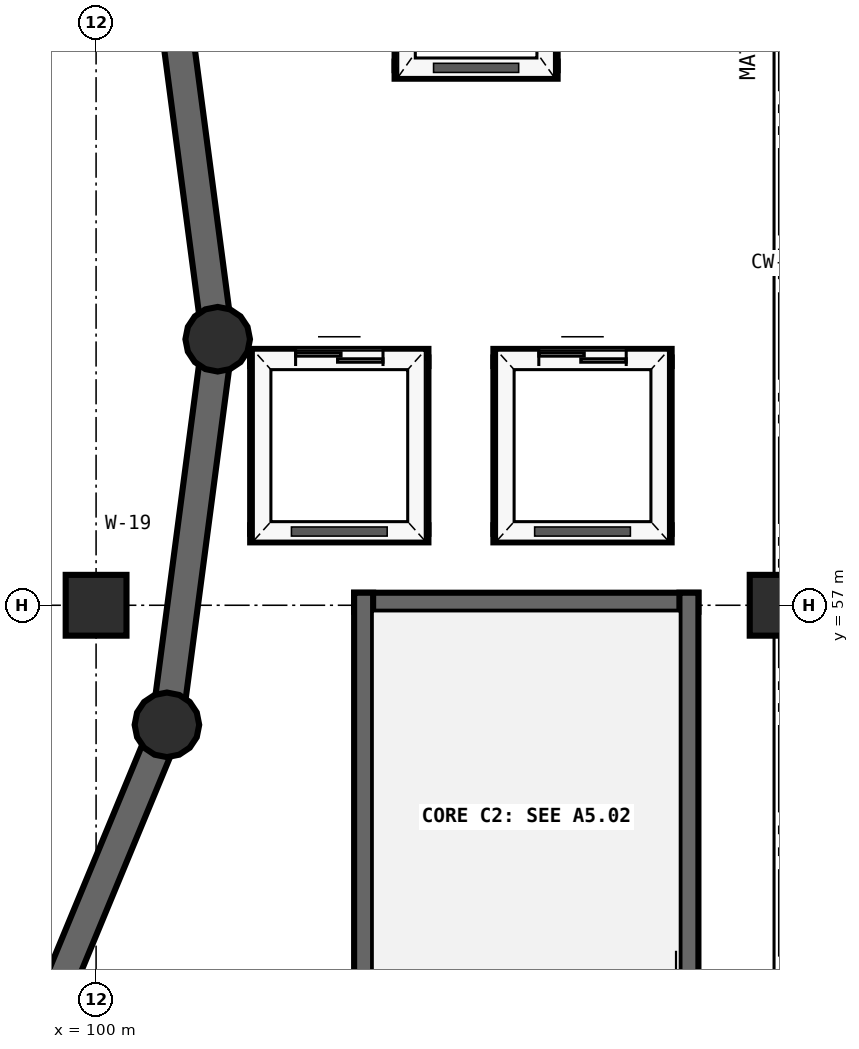
"""IFC4 building model, lengths in metres.
Left out: names, types, materials, properties, quantities, classifications, styles, units other than length and angle.
Written with IfcOpenShell. Run it as: python <this file> out.ifc"""

import sys

from ifc_helpers import new_model, si_unit, direction, frame, frame_2d, origin, origin_2d, place, context, subcontext, project, spatial, rectangle, circle, extrude, element, fill, save


model = new_model("IFC4")
c1 = context("Model", 3, precision=1e-05, world=origin(), true_north=direction((0.0, 1.0)))
c2 = subcontext(c1, "Body", "Model", "MODEL_VIEW")
j1 = project(units=[si_unit("LENGTHUNIT", "METRE"), si_unit("PLANEANGLEUNIT", "RADIAN")], contexts=[c1])
p1 = place(None, origin())
s1 = spatial("IfcSite", under=j1, at=p1, CompositionType="ELEMENT")
p2 = place(p1, origin())
s2 = spatial("IfcBuilding", under=s1, at=p2, CompositionType="ELEMENT")
p3 = place(p2, frame((0.0, 0.0, 5.4)))
s3 = spatial("IfcBuildingStorey", under=s2, at=p3, CompositionType="ELEMENT", Elevation=5.4)
for number, where, z_axis, x_axis in (
    (1, (100.0, 57.0, 0.0), (0.0, 0.0, 1.0), (1.0, 0.0, 0.0)),
    (2, (109.0, 57.0, 0.0), (0.0, 0.0, 1.0), (1.0, 0.0, 0.0)),
):
    element("IfcColumn", number, at=place(p3, frame(where, z_axis=z_axis, x_axis=x_axis)), inside=s3, PredefinedType="COLUMN", context=c2, shape_type="SweptSolid", body=[
        extrude(rectangle(XDim=0.8, YDim=0.8, at=origin_2d()), origin(), (0.0, 0.0, 1.0), 4.54),
    ])
for number, where, z_axis, x_axis in (
    (3, (101.6, 60.5, 0.0), (0.0, 0.0, 1.0), (1.0, 0.0, 0.0)),
    (4, (100.932, 55.427, 0.0), (0.0, 0.0, 1.0), (1.0, 0.0, 0.0)),
):
    element("IfcColumn", number, at=place(p3, frame(where, z_axis=z_axis, x_axis=x_axis)), inside=s3, PredefinedType="COLUMN", context=c2, shape_type="SweptSolid", body=[
        extrude(circle(Radius=0.425, at=origin_2d()), origin(), (0.0, 0.0, 1.0), 4.54),
    ])
p4 = place(p3, frame((101.6, 60.5, 0.0), z_axis=(0.0, 0.0, 1.0), x_axis=(-0.130591512704, 0.99143625958, 0.0)))
e5 = element("IfcWall", 5, at=p4, inside=s3, PredefinedType="SHEAR", context=c2, shape_type="SweptSolid", body=[
    extrude(rectangle(XDim=5.117, YDim=0.4, at=frame_2d((2.558, 0.0))), origin(), (0.0, 0.0, 1.0), 4.54),
])
p5 = place(p3, frame((98.974, 50.7, 0.0), z_axis=(0.0, 0.0, 1.0), x_axis=(0.382642581018, 0.923896452635, 0.0)))
e6 = element("IfcWall", 6, at=p5, inside=s3, PredefinedType="SHEAR", context=c2, shape_type="SweptSolid", body=[
    extrude(rectangle(XDim=5.116, YDim=0.4, at=frame_2d((2.558, 0.0))), origin(), (0.0, 0.0, 1.0), 4.54),
])
p6 = place(p3, frame((100.932, 55.427, 0.0), z_axis=(0.0, 0.0, 1.0), x_axis=(0.130591512704, 0.99143625958, 0.0)))
e7 = element("IfcWall", 7, at=p6, inside=s3, PredefinedType="SHEAR", context=c2, shape_type="SweptSolid", body=[
    extrude(rectangle(XDim=5.117, YDim=0.4, at=frame_2d((2.558, 0.0))), origin(), (0.0, 0.0, 1.0), 4.54),
])
p7 = place(p3, frame((103.395, 57.04, 0.0), z_axis=(0.0, 0.0, 1.0), x_axis=(1.0, 0.0, 0.0)))
e8 = element("IfcWall", 8, at=p7, inside=s3, PredefinedType="SHEAR", context=c2, shape_type="SweptSolid", body=[
    extrude(rectangle(XDim=4.53, YDim=0.25, at=frame_2d((2.265, 0.0))), origin(), (0.0, 0.0, 1.0), 4.54),
])
for number, where, z_axis, x_axis in (
    (9, (103.52, 46.075, 0.0), (0.0, 0.0, 1.0), (0.0, 1.0, 0.0)),
    (10, (107.8, 46.075, 0.0), (0.0, 0.0, 1.0), (0.0, 1.0, 0.0)),
):
    element("IfcWall", number, at=place(p3, frame(where, z_axis=z_axis, x_axis=x_axis)), inside=s3, PredefinedType="SHEAR", context=c2, shape_type="SweptSolid", body=[
        extrude(rectangle(XDim=11.09, YDim=0.25, at=frame_2d((5.545, 0.0))), origin(), (0.0, 0.0, 1.0), 4.54),
    ])
p8 = place(p3, frame((102.028, 60.26, 0.0), z_axis=(0.0, 0.0, 1.0), x_axis=(1.0, 0.0, 0.0)))
e11 = element("IfcWall", 11, at=p8, inside=s3, PredefinedType="SOLIDWALL", context=c2, shape_type="SweptSolid", body=[
    extrude(rectangle(XDim=2.345, YDim=0.225, at=frame_2d((1.172, 0.0))), origin(), (0.0, 0.0, 1.0), 4.49),
])
p9 = place(p8, frame((0.597, 0.0, 0.0)))
e12 = element("IfcOpeningElement", 12, at=p9, cuts=e11, PredefinedType="OPENING", context=c2, shape_type="SweptSolid", body=[
    extrude(rectangle(XDim=1.15, YDim=2.2, at=frame_2d((0.575, 1.1))), frame((0.0, 0.123, 0.0), z_axis=(0.0, -1.0, 0.0), x_axis=(1.0, 0.0, 0.0)), (0.0, 0.0, 1.0), 0.245),
])
p10 = place(p3, frame((102.028, 57.94, 0.0), z_axis=(0.0, 0.0, 1.0), x_axis=(1.0, 0.0, 0.0)))
e13 = element("IfcWall", 13, at=p10, inside=s3, PredefinedType="SOLIDWALL", context=c2, shape_type="SweptSolid", body=[
    extrude(rectangle(XDim=2.345, YDim=0.225, at=frame_2d((1.172, 0.0))), origin(), (0.0, 0.0, 1.0), 4.49),
])
for number, where, z_axis, x_axis in (
    (14, (102.14, 57.94, 0.0), (0.0, 0.0, 1.0), (0.0, 1.0, 0.0)),
    (15, (104.26, 57.94, 0.0), (0.0, 0.0, 1.0), (0.0, 1.0, 0.0)),
):
    element("IfcWall", number, at=place(p3, frame(where, z_axis=z_axis, x_axis=x_axis)), inside=s3, PredefinedType="SOLIDWALL", context=c2, shape_type="SweptSolid", body=[
        extrude(rectangle(XDim=2.32, YDim=0.225, at=frame_2d((1.16, 0.0))), origin(), (0.0, 0.0, 1.0), 4.49),
    ])
p11 = place(p3, frame((105.228, 60.26, 0.0), z_axis=(0.0, 0.0, 1.0), x_axis=(1.0, 0.0, 0.0)))
e16 = element("IfcWall", 16, at=p11, inside=s3, PredefinedType="SOLIDWALL", context=c2, shape_type="SweptSolid", body=[
    extrude(rectangle(XDim=2.345, YDim=0.225, at=frame_2d((1.172, 0.0))), origin(), (0.0, 0.0, 1.0), 4.49),
])
p12 = place(p11, frame((0.597, 0.0, 0.0)))
e17 = element("IfcOpeningElement", 17, at=p12, cuts=e16, PredefinedType="OPENING", context=c2, shape_type="SweptSolid", body=[
    extrude(rectangle(XDim=1.15, YDim=2.2, at=frame_2d((0.575, 1.1))), frame((0.0, 0.123, 0.0), z_axis=(0.0, -1.0, 0.0), x_axis=(1.0, 0.0, 0.0)), (0.0, 0.0, 1.0), 0.245),
])
p13 = place(p3, frame((105.228, 57.94, 0.0), z_axis=(0.0, 0.0, 1.0), x_axis=(1.0, 0.0, 0.0)))
e18 = element("IfcWall", 18, at=p13, inside=s3, PredefinedType="SOLIDWALL", context=c2, shape_type="SweptSolid", body=[
    extrude(rectangle(XDim=2.345, YDim=0.225, at=frame_2d((1.172, 0.0))), origin(), (0.0, 0.0, 1.0), 4.49),
])
for number, where, z_axis, x_axis in (
    (19, (105.34, 57.94, 0.0), (0.0, 0.0, 1.0), (0.0, 1.0, 0.0)),
    (20, (107.46, 57.94, 0.0), (0.0, 0.0, 1.0), (0.0, 1.0, 0.0)),
):
    element("IfcWall", number, at=place(p3, frame(where, z_axis=z_axis, x_axis=x_axis)), inside=s3, PredefinedType="SOLIDWALL", context=c2, shape_type="SweptSolid", body=[
        extrude(rectangle(XDim=2.32, YDim=0.225, at=frame_2d((1.16, 0.0))), origin(), (0.0, 0.0, 1.0), 4.49),
    ])
p14 = place(p3, frame((103.927, 64.04, 0.0), z_axis=(0.0, 0.0, 1.0), x_axis=(1.0, 0.0, 0.0)))
e21 = element("IfcWall", 21, at=p14, inside=s3, PredefinedType="SOLIDWALL", context=c2, shape_type="SweptSolid", body=[
    extrude(rectangle(XDim=2.145, YDim=0.225, at=frame_2d((1.073, 0.0))), origin(), (0.0, 0.0, 1.0), 4.49),
])
for number, where, z_axis, x_axis in (
    (22, (104.04, 64.04, 0.0), (0.0, 0.0, 1.0), (0.0, 1.0, 0.0)),
    (23, (105.96, 64.04, 0.0), (0.0, 0.0, 1.0), (0.0, 1.0, 0.0)),
):
    element("IfcWall", number, at=place(p3, frame(where, z_axis=z_axis, x_axis=x_axis)), inside=s3, PredefinedType="SOLIDWALL", context=c2, shape_type="SweptSolid", body=[
        extrude(rectangle(XDim=2.72, YDim=0.225, at=frame_2d((1.36, 0.0))), origin(), (0.0, 0.0, 1.0), 4.49),
    ])
p15 = place(p9, origin())
e24 = element("IfcDoor", 24, at=p15, inside=s3, OperationType="DOUBLE_DOOR_SLIDING", PredefinedType="DOOR", context=c2, shape_type="SweptSolid", body=[
    extrude(rectangle(XDim=1.15, YDim=2.2, at=frame_2d((0.575, 1.1))), frame((0.0, 0.025, 0.0), z_axis=(0.0, -1.0, 0.0), x_axis=(1.0, 0.0, 0.0)), (0.0, 0.0, 1.0), 0.05),
])
fill(e12, e24)
p16 = place(p12, origin())
e25 = element("IfcDoor", 25, at=p16, inside=s3, OperationType="DOUBLE_DOOR_SLIDING", PredefinedType="DOOR", context=c2, shape_type="SweptSolid", body=[
    extrude(rectangle(XDim=1.15, YDim=2.2, at=frame_2d((0.575, 1.1))), frame((0.0, 0.025, 0.0), z_axis=(0.0, -1.0, 0.0), x_axis=(1.0, 0.0, 0.0)), (0.0, 0.0, 1.0), 0.05),
])
fill(e17, e25)
save(model, sys.argv[1])
